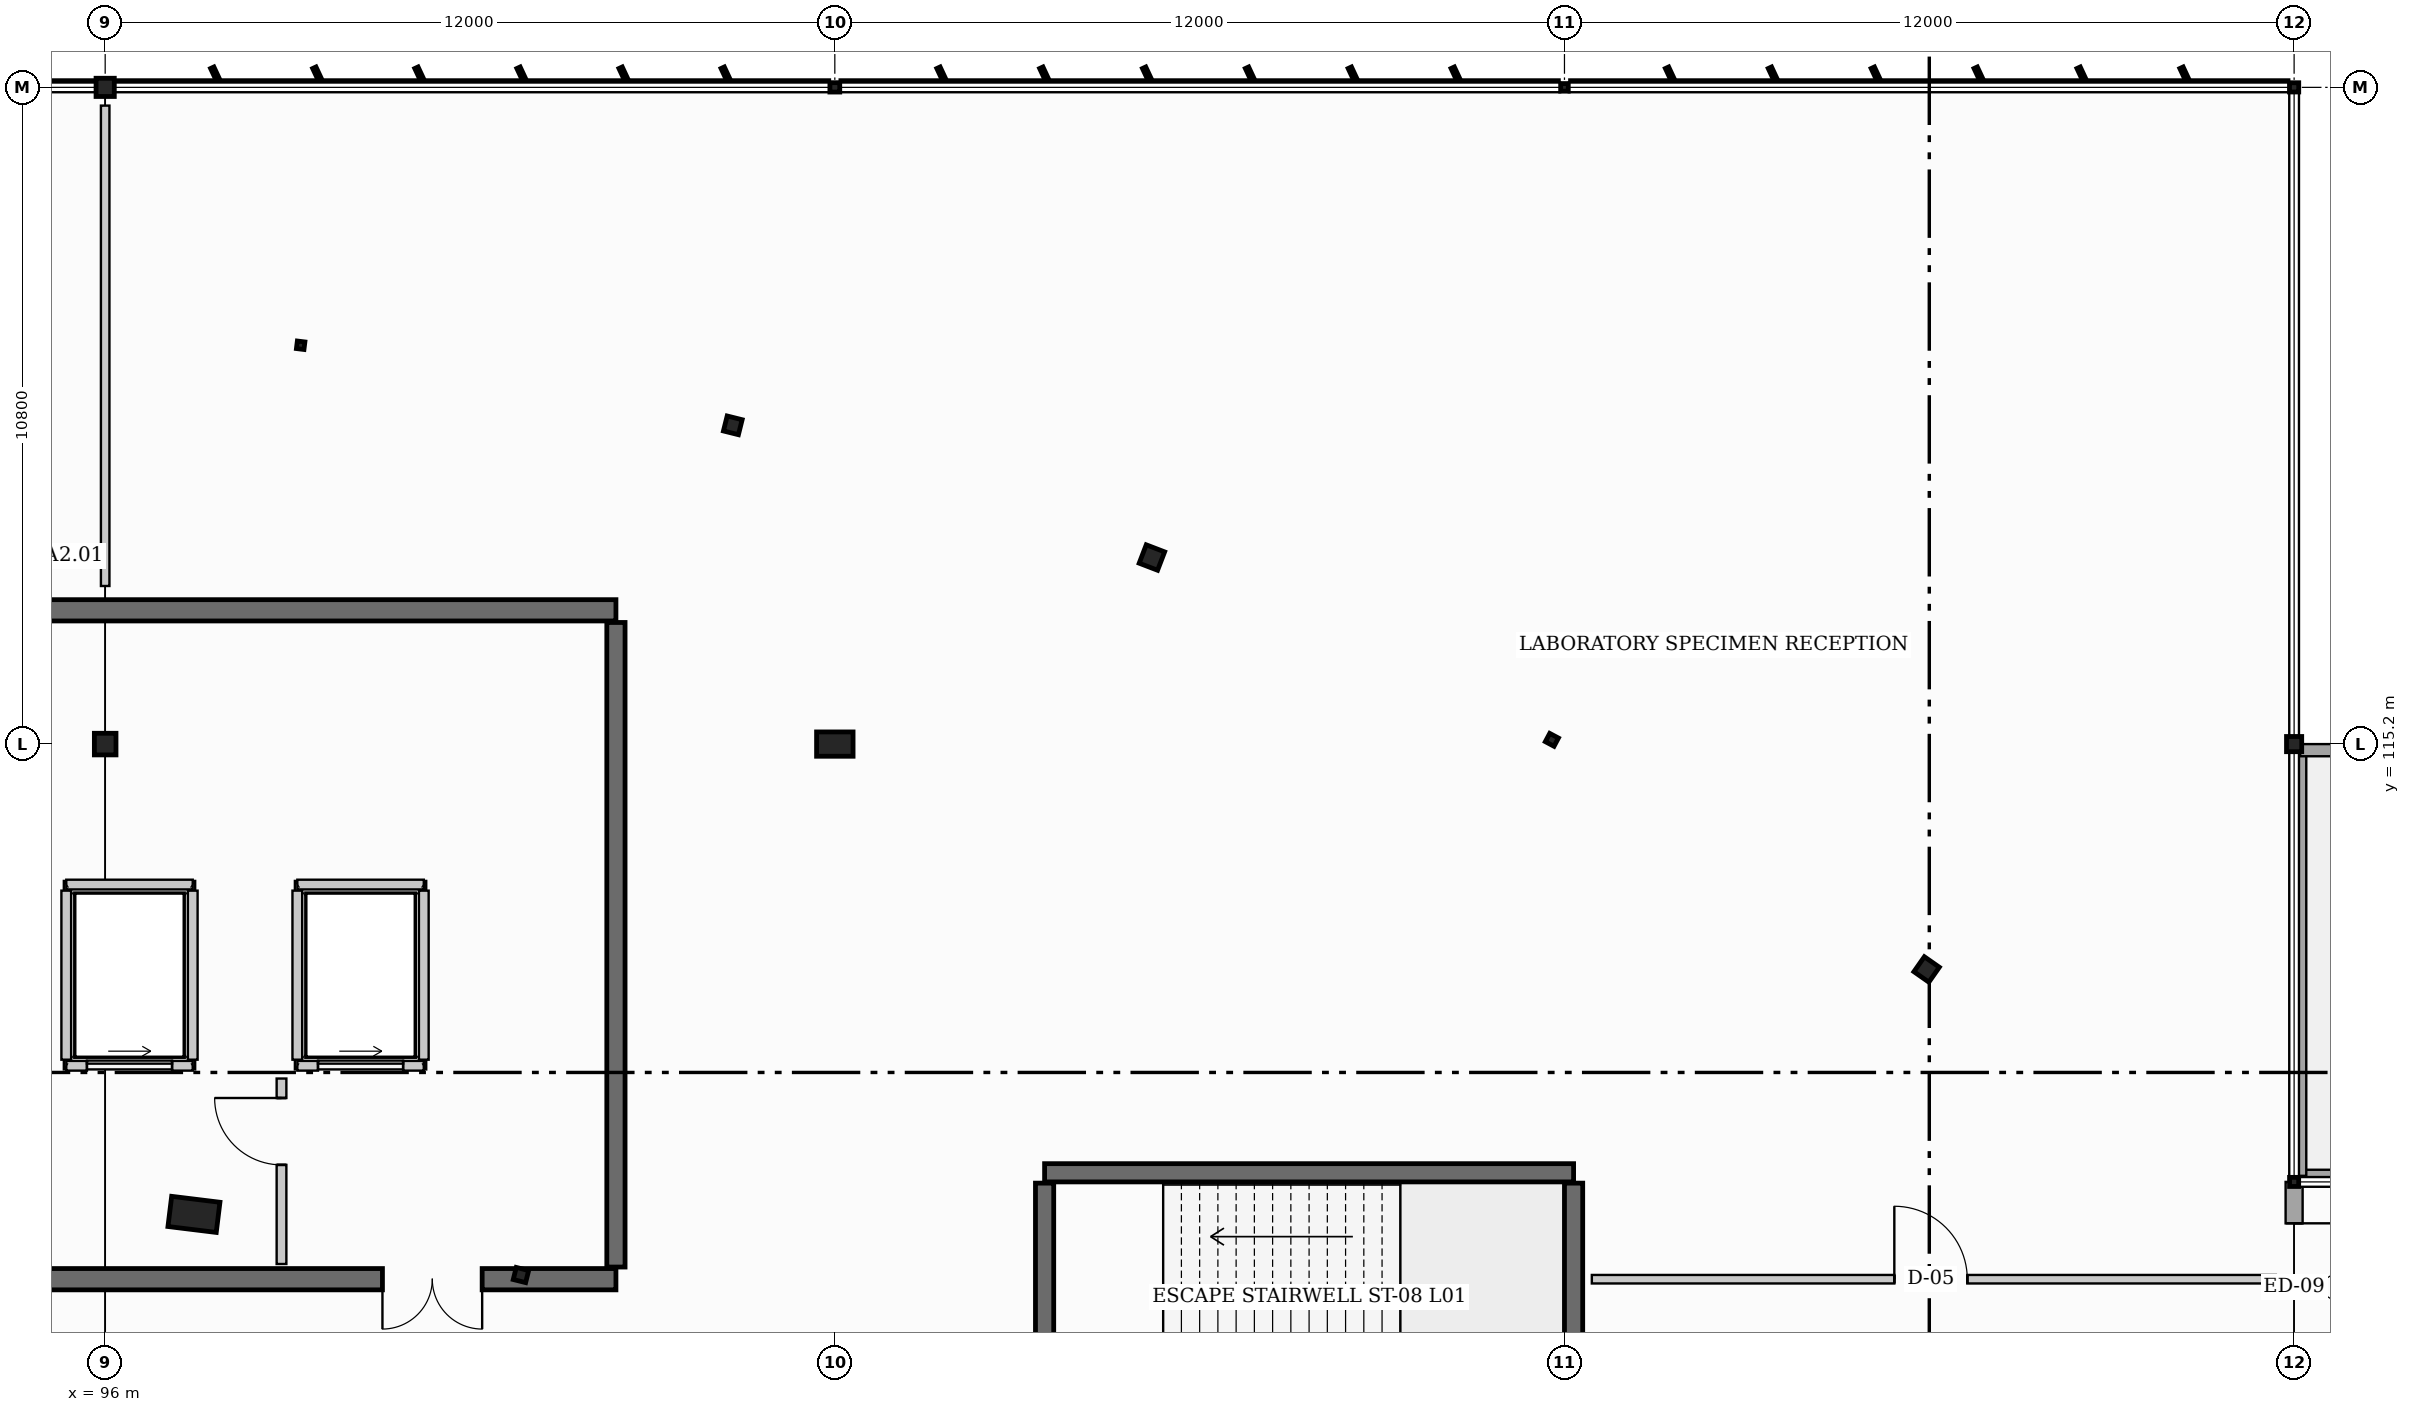
"""IFC4 building model, lengths in metres.
Left out: names, types, materials, properties, quantities, classifications, styles, units other than length and angle.
Written with IfcOpenShell. Run it as: python <this file> out.ifc"""

import sys

from ifc_helpers import new_model, si_unit, direction, frame, frame_2d, origin, origin_2d, place, context, subcontext, project, spatial, rectangle, hollow_rectangle, hollow_circle, i_section, extrude, element, fill, save


model = new_model("IFC4")
c1 = context("Model", 3, precision=1e-05, world=origin(), true_north=direction((0.0, 1.0)))
c2 = subcontext(c1, "Body", "Model", "MODEL_VIEW")
j1 = project(units=[si_unit("LENGTHUNIT", "METRE"), si_unit("PLANEANGLEUNIT", "RADIAN")], contexts=[c1])
p1 = place(None, origin())
s1 = spatial("IfcSite", under=j1, at=p1, CompositionType="ELEMENT")
p2 = place(p1, origin())
s2 = spatial("IfcBuilding", under=s1, at=p2, CompositionType="ELEMENT")
p3 = place(p2, frame((0.0, 0.0, 4.8)))
s3 = spatial("IfcBuildingStorey", under=s2, at=p3, CompositionType="ELEMENT", Elevation=4.8)
p4 = place(p3, frame((96.0, 115.2, 0.0), z_axis=(0.0, 0.0, 1.0), x_axis=(1.0, 0.0, 0.0)))
e1 = element("IfcColumn", 1, at=p4, inside=s3, PredefinedType="COLUMN", context=c2, shape_type="SweptSolid", body=[
    extrude(hollow_circle(Radius=0.178, WallThickness=0.013, at=origin_2d()), origin(), (0.0, 0.0, 1.0), 4.8),
])
p5 = place(p3, frame((96.0, 126.0, 0.0), z_axis=(0.0, 0.0, 1.0), x_axis=(1.0, 0.0, 0.0)))
e2 = element("IfcColumn", 2, at=p5, inside=s3, PredefinedType="COLUMN", context=c2, shape_type="SweptSolid", body=[
    extrude(hollow_rectangle(XDim=0.3, YDim=0.3, WallThickness=0.012, at=origin_2d()), origin(), (0.0, 0.0, 1.0), 4.8),
])
p6 = place(p3, frame((108.0, 115.2, 0.0), z_axis=(0.0, 0.0, 1.0), x_axis=(0.0, 1.0, 0.0)))
e3 = element("IfcColumn", 3, at=p6, inside=s3, PredefinedType="PILASTER", context=c2, shape_type="SweptSolid", body=[
    extrude(rectangle(XDim=0.4, YDim=0.6, at=origin_2d()), origin(), (0.0, 0.0, 1.0), 4.8),
])
p7 = place(p3, frame((108.0, 126.0, 0.0), z_axis=(0.0, 0.0, 1.0), x_axis=(0.0, 1.0, 0.0)))
e4 = element("IfcColumn", 4, at=p7, inside=s3, PredefinedType="COLUMN", context=c2, shape_type="SweptSolid", body=[
    extrude(i_section(OverallWidth=0.154, OverallDepth=0.162, WebThickness=0.008, FlangeThickness=0.011, at=origin_2d()), origin(), (0.0, 0.0, 1.0), 4.8),
])
p8 = place(p3, frame((120.0, 126.0, 0.0), z_axis=(0.0, 0.0, 1.0), x_axis=(1.0, 0.0, 0.0)))
e5 = element("IfcColumn", 5, at=p8, inside=s3, PredefinedType="COLUMN", context=c2, shape_type="SweptSolid", body=[
    extrude(hollow_rectangle(XDim=0.125, YDim=0.125, WallThickness=0.006, at=origin_2d()), origin(), (0.0, 0.0, 1.0), 4.8),
])
p9 = place(p3, frame((132.0, 115.2, 0.0), z_axis=(0.0, 0.0, 1.0), x_axis=(0.0, 1.0, 0.0)))
e6 = element("IfcColumn", 6, at=p9, inside=s3, PredefinedType="COLUMN", context=c2, shape_type="SweptSolid", body=[
    extrude(hollow_rectangle(XDim=0.25, YDim=0.25, WallThickness=0.012, at=origin_2d()), origin(), (0.0, 0.0, 1.0), 4.8),
])
p10 = place(p3, frame((132.0, 126.0, 0.0), z_axis=(0.0, 0.0, 1.0), x_axis=(0.0, 1.0, 0.0)))
e7 = element("IfcColumn", 7, at=p10, inside=s3, PredefinedType="COLUMN", context=c2, shape_type="SweptSolid", body=[
    extrude(i_section(OverallWidth=0.152, OverallDepth=0.152, WebThickness=0.006, FlangeThickness=0.007, at=origin_2d()), origin(), (0.0, 0.0, 1.0), 4.8),
])
p11 = place(p3, frame((99.215, 121.759, 0.0), z_axis=(0.0, 0.0, 1.0), x_axis=(0.121869343405, 0.992546151641, 0.0)))
e8 = element("IfcColumn", 8, at=p11, inside=s3, PredefinedType="COLUMN", context=c2, shape_type="SweptSolid", body=[
    extrude(hollow_rectangle(XDim=0.125, YDim=0.125, WallThickness=0.006, at=origin_2d()), origin(), (0.0, 0.0, 1.0), 4.8),
])
p12 = place(p3, frame((97.46, 107.466, 0.0), z_axis=(0.0, 0.0, 1.0), x_axis=(0.121869343405, 0.992546151641, 0.0)))
e9 = element("IfcColumn", 9, at=p12, inside=s3, PredefinedType="PILASTER", context=c2, shape_type="SweptSolid", body=[
    extrude(rectangle(XDim=0.5, YDim=0.8, at=origin_2d()), origin(), (0.0, 0.0, 1.0), 4.8),
])
p13 = place(p3, frame((106.322, 120.442, 0.0), z_axis=(0.0, 0.0, 1.0), x_axis=(0.2419218956, 0.970295726276, 0.0)))
e10 = element("IfcColumn", 10, at=p13, inside=s3, PredefinedType="COLUMN", context=c2, shape_type="SweptSolid", body=[
    extrude(i_section(OverallWidth=0.254, OverallDepth=0.254, WebThickness=0.009, FlangeThickness=0.014, at=origin_2d()), origin(), (0.0, 0.0, 1.0), 4.8),
])
p14 = place(p3, frame((102.838, 106.469, 0.0), z_axis=(0.0, 0.0, 1.0), x_axis=(0.2419218956, 0.970295726276, 0.0)))
e11 = element("IfcColumn", 11, at=p14, inside=s3, PredefinedType="COLUMN", context=c2, shape_type="SweptSolid", body=[
    extrude(i_section(OverallWidth=0.205, OverallDepth=0.21, WebThickness=0.009, FlangeThickness=0.014, at=origin_2d()), origin(), (0.0, 0.0, 1.0), 4.8),
])
p15 = place(p3, frame((113.215, 118.268, 0.0), z_axis=(0.0, 0.0, 1.0), x_axis=(0.358367949545, 0.933580426497, 0.0)))
e12 = element("IfcColumn", 12, at=p15, inside=s3, PredefinedType="COLUMN", context=c2, shape_type="SweptSolid", body=[
    extrude(hollow_circle(Radius=0.162, WallThickness=0.013, at=origin_2d()), origin(), (0.0, 0.0, 1.0), 4.8),
])
p16 = place(p3, frame((119.793, 115.27, 0.0), z_axis=(0.0, 0.0, 1.0), x_axis=(0.469471562786, 0.882947592859, 0.0)))
e13 = element("IfcColumn", 13, at=p16, inside=s3, PredefinedType="COLUMN", context=c2, shape_type="SweptSolid", body=[
    extrude(i_section(OverallWidth=0.154, OverallDepth=0.162, WebThickness=0.008, FlangeThickness=0.011, at=origin_2d()), origin(), (0.0, 0.0, 1.0), 4.8),
])
p17 = place(p3, frame((125.956, 111.494, 0.0), z_axis=(0.0, 0.0, 1.0), x_axis=(0.573576436351, 0.819152044289, 0.0)))
e14 = element("IfcColumn", 14, at=p17, inside=s3, PredefinedType="COLUMN", context=c2, shape_type="SweptSolid", body=[
    extrude(hollow_rectangle(XDim=0.3, YDim=0.3, WallThickness=0.012, at=origin_2d()), origin(), (0.0, 0.0, 1.0), 4.8),
])
p18 = place(p3, frame((132.0, 108.0, 0.0), z_axis=(0.0, 0.0, 1.0), x_axis=(1.0, 0.0, 0.0)))
e15 = element("IfcColumn", 15, at=p18, inside=s3, PredefinedType="COLUMN", context=c2, shape_type="SweptSolid", body=[
    extrude(hollow_rectangle(XDim=0.15, YDim=0.15, WallThickness=0.008, at=origin_2d()), origin(), (0.0, 0.0, 1.0), 4.8),
])
p19 = place(p3, frame((84.0, 117.4, 0.0), z_axis=(0.0, 0.0, 1.0), x_axis=(1.0, 0.0, 0.0)))
e16 = element("IfcWall", 16, at=p19, inside=s3, PredefinedType="SHEAR", context=c2, shape_type="SweptSolid", body=[
    extrude(rectangle(XDim=20.4, YDim=0.35, at=frame_2d((10.2, 0.0))), origin(), (0.0, 0.0, 1.0), 4.8),
])
p20 = place(p3, frame((104.4, 106.4, 0.0), z_axis=(0.0, 0.0, 1.0), x_axis=(-1.0, 0.0, 0.0)))
e17 = element("IfcWall", 17, at=p20, inside=s3, PredefinedType="SHEAR", context=c2, shape_type="SweptSolid", body=[
    extrude(rectangle(XDim=20.4, YDim=0.35, at=frame_2d((10.2, 0.0))), origin(), (0.0, 0.0, 1.0), 4.8),
])
p21 = place(p20, frame((2.2, 0.0, 0.0)))
e18 = element("IfcOpeningElement", 18, at=p21, cuts=e17, PredefinedType="OPENING", context=c2, shape_type="SweptSolid", body=[
    extrude(rectangle(XDim=1.64, YDim=2.2, at=frame_2d((0.82, 1.1))), frame((0.0, 0.185, 0.0), z_axis=(0.0, -1.0, 0.0), x_axis=(1.0, 0.0, 0.0)), (0.0, 0.0, 1.0), 0.37),
])
p22 = place(p20, frame((13.0, 0.0, 0.0)))
e19 = element("IfcOpeningElement", 19, at=p22, cuts=e17, PredefinedType="OPENING", context=c2, shape_type="SweptSolid", body=[
    extrude(rectangle(XDim=1.52, YDim=2.16, at=frame_2d((0.76, 1.08))), frame((0.0, 0.185, 0.0), z_axis=(0.0, -1.0, 0.0), x_axis=(1.0, 0.0, 0.0)), (0.0, 0.0, 1.0), 0.37),
])
p23 = place(p3, frame((104.4, 117.2, 0.0), z_axis=(0.0, 0.0, 1.0), x_axis=(0.0, -1.0, 0.0)))
e20 = element("IfcWall", 20, at=p23, inside=s3, PredefinedType="SHEAR", context=c2, shape_type="SweptSolid", body=[
    extrude(rectangle(XDim=10.6, YDim=0.3, at=frame_2d((5.3, 0.0))), origin(), (0.0, 0.0, 1.0), 4.8),
])
p24 = place(p3, frame((120.15, 108.15, 0.0), z_axis=(0.0, 0.0, 1.0), x_axis=(-1.0, 0.0, 0.0)))
e21 = element("IfcWall", 21, at=p24, inside=s3, PredefinedType="SHEAR", context=c2, shape_type="SweptSolid", body=[
    extrude(rectangle(XDim=8.7, YDim=0.3, at=frame_2d((4.35, 0.0))), origin(), (0.0, 0.0, 1.0), 4.8),
])
for number, where, z_axis, x_axis in (
    (22, (111.45, 104.22, 0.0), (0.0, 0.0, 1.0), (0.0, 1.0, 0.0)),
    (23, (120.15, 104.22, 0.0), (0.0, 0.0, 1.0), (0.0, 1.0, 0.0)),
):
    element("IfcWall", number, at=place(p3, frame(where, z_axis=z_axis, x_axis=x_axis)), inside=s3, PredefinedType="SHEAR", context=c2, shape_type="SweptSolid", body=[
        extrude(rectangle(XDim=3.76, YDim=0.3, at=frame_2d((1.88, 0.0))), origin(), (0.0, 0.0, 1.0), 4.8),
    ])
p25 = place(p3, frame((132.0, 108.0, 0.0), z_axis=(0.0, 0.0, 1.0), x_axis=(0.0, -1.0, 0.0)))
e24 = element("IfcWall", 24, at=p25, inside=s3, PredefinedType="STANDARD", context=c2, shape_type="SweptSolid", body=[
    extrude(rectangle(XDim=9.6, YDim=0.28, at=frame_2d((4.8, 0.0))), origin(), (0.0, 0.0, 1.0), 3.818),
])
p26 = place(p25, frame((0.681, 0.0, 0.0)))
e25 = element("IfcOpeningElement", 25, at=p26, cuts=e24, PredefinedType="OPENING", context=c2, shape_type="SweptSolid", body=[
    extrude(rectangle(XDim=2.1, YDim=2.25, at=frame_2d((1.05, 1.125))), frame((0.0, 0.15, 0.0), z_axis=(0.0, -1.0, 0.0), x_axis=(1.0, 0.0, 0.0)), (0.0, 0.0, 1.0), 0.3),
])
p27 = place(p3, frame((143.9, 108.1, 0.31), z_axis=(0.0, 0.0, 1.0), x_axis=(-1.0, 0.0, 0.0)))
e26 = element("IfcWall", 26, at=p27, inside=s3, PredefinedType="PARAPET", context=c2, shape_type="SweptSolid", body=[
    extrude(rectangle(XDim=11.8, YDim=0.2, at=frame_2d((5.9, 0.0))), origin(), (0.0, 0.0, 1.0), 1.12),
])
p28 = place(p3, frame((132.1, 108.1, 0.31), z_axis=(0.0, 0.0, 1.0), x_axis=(0.0, 1.0, 0.0)))
e27 = element("IfcWall", 27, at=p28, inside=s3, PredefinedType="PARAPET", context=c2, shape_type="SweptSolid", body=[
    extrude(rectangle(XDim=7.0, YDim=0.2, at=frame_2d((3.5, 0.0))), origin(), (0.0, 0.0, 1.0), 1.12),
])
p29 = place(p3, frame((132.1, 115.1, 0.31), z_axis=(0.0, 0.0, 1.0), x_axis=(1.0, 0.0, 0.0)))
e28 = element("IfcWall", 28, at=p29, inside=s3, PredefinedType="PARAPET", context=c2, shape_type="SweptSolid", body=[
    extrude(rectangle(XDim=11.8, YDim=0.2, at=frame_2d((5.9, 0.0))), origin(), (0.0, 0.0, 1.0), 1.12),
])
p30 = place(p3, frame((95.36, 109.91, 0.0), z_axis=(0.0, 0.0, 1.0), x_axis=(1.0, 0.0, 0.0)))
e29 = element("IfcWall", 29, at=p30, inside=s3, PredefinedType="PARTITIONING", context=c2, shape_type="SweptSolid", body=[
    extrude(rectangle(XDim=2.08, YDim=0.16, at=frame_2d((1.04, 0.0))), origin(), (0.0, 0.0, 1.0), 4.43),
])
p31 = place(p30, frame((0.34, 0.0, 0.0)))
e30 = element("IfcOpeningElement", 30, at=p31, cuts=e29, PredefinedType="OPENING", context=c2, shape_type="SweptSolid", body=[
    extrude(rectangle(XDim=1.4, YDim=2.2, at=frame_2d((0.7, 1.1))), frame((0.0, 0.09, 0.0), z_axis=(0.0, -1.0, 0.0), x_axis=(1.0, 0.0, 0.0)), (0.0, 0.0, 1.0), 0.18),
])
p32 = place(p3, frame((97.44, 112.89, 0.0), z_axis=(0.0, 0.0, 1.0), x_axis=(-1.0, 0.0, 0.0)))
e31 = element("IfcWall", 31, at=p32, inside=s3, PredefinedType="PARTITIONING", context=c2, shape_type="SweptSolid", body=[
    extrude(rectangle(XDim=2.08, YDim=0.16, at=frame_2d((1.04, 0.0))), origin(), (0.0, 0.0, 1.0), 4.43),
])
for number, where, z_axis, x_axis in (
    (32, (95.36, 112.79, 0.0), (0.0, 0.0, 1.0), (0.0, -1.0, 0.0)),
    (33, (97.44, 110.01, 0.0), (0.0, 0.0, 1.0), (0.0, 1.0, 0.0)),
):
    element("IfcWall", number, at=place(p3, frame(where, z_axis=z_axis, x_axis=x_axis)), inside=s3, PredefinedType="PARTITIONING", context=c2, shape_type="SweptSolid", body=[
        extrude(rectangle(XDim=2.78, YDim=0.16, at=frame_2d((1.39, 0.0))), origin(), (0.0, 0.0, 1.0), 4.43),
    ])
p33 = place(p3, frame((99.16, 109.91, 0.0), z_axis=(0.0, 0.0, 1.0), x_axis=(1.0, 0.0, 0.0)))
e34 = element("IfcWall", 34, at=p33, inside=s3, PredefinedType="PARTITIONING", context=c2, shape_type="SweptSolid", body=[
    extrude(rectangle(XDim=2.08, YDim=0.16, at=frame_2d((1.04, 0.0))), origin(), (0.0, 0.0, 1.0), 4.43),
])
p34 = place(p33, frame((0.34, 0.0, 0.0)))
e35 = element("IfcOpeningElement", 35, at=p34, cuts=e34, PredefinedType="OPENING", context=c2, shape_type="SweptSolid", body=[
    extrude(rectangle(XDim=1.4, YDim=2.2, at=frame_2d((0.7, 1.1))), frame((0.0, 0.09, 0.0), z_axis=(0.0, -1.0, 0.0), x_axis=(1.0, 0.0, 0.0)), (0.0, 0.0, 1.0), 0.18),
])
p35 = place(p3, frame((101.24, 112.89, 0.0), z_axis=(0.0, 0.0, 1.0), x_axis=(-1.0, 0.0, 0.0)))
e36 = element("IfcWall", 36, at=p35, inside=s3, PredefinedType="PARTITIONING", context=c2, shape_type="SweptSolid", body=[
    extrude(rectangle(XDim=2.08, YDim=0.16, at=frame_2d((1.04, 0.0))), origin(), (0.0, 0.0, 1.0), 4.43),
])
for number, where, z_axis, x_axis in (
    (37, (99.16, 112.79, 0.0), (0.0, 0.0, 1.0), (0.0, -1.0, 0.0)),
    (38, (101.24, 110.01, 0.0), (0.0, 0.0, 1.0), (0.0, 1.0, 0.0)),
):
    element("IfcWall", number, at=place(p3, frame(where, z_axis=z_axis, x_axis=x_axis)), inside=s3, PredefinedType="PARTITIONING", context=c2, shape_type="SweptSolid", body=[
        extrude(rectangle(XDim=2.78, YDim=0.16, at=frame_2d((1.39, 0.0))), origin(), (0.0, 0.0, 1.0), 4.43),
    ])
p36 = place(p3, frame((98.9, 106.65, 0.0), z_axis=(0.0, 0.0, 1.0), x_axis=(0.0, 1.0, 0.0)))
e39 = element("IfcWall", 39, at=p36, inside=s3, PredefinedType="PARTITIONING", context=c2, shape_type="SweptSolid", body=[
    extrude(rectangle(XDim=3.05, YDim=0.16, at=frame_2d((1.525, 0.0))), origin(), (0.0, 0.0, 1.0), 4.43),
])
p37 = place(p36, frame((1.63, 0.0, 0.0)))
e40 = element("IfcOpeningElement", 40, at=p37, cuts=e39, PredefinedType="OPENING", context=c2, shape_type="SweptSolid", body=[
    extrude(rectangle(XDim=1.1, YDim=2.15, at=frame_2d((0.55, 1.075))), frame((0.0, 0.09, 0.0), z_axis=(0.0, -1.0, 0.0), x_axis=(1.0, 0.0, 0.0)), (0.0, 0.0, 1.0), 0.18),
])
p38 = place(p3, frame((96.0, 117.8, 0.0), z_axis=(0.0, 0.0, 1.0), x_axis=(0.0, 1.0, 0.0)))
e41 = element("IfcWall", 41, at=p38, inside=s3, PredefinedType="PARTITIONING", context=c2, shape_type="SweptSolid", body=[
    extrude(rectangle(XDim=7.9, YDim=0.14, at=frame_2d((3.95, 0.0))), origin(), (0.0, 0.0, 1.0), 3.97),
])
p39 = place(p3, frame((120.45, 106.4, 0.0), z_axis=(0.0, 0.0, 1.0), x_axis=(1.0, 0.0, 0.0)))
e42 = element("IfcWall", 42, at=p39, inside=s3, PredefinedType="PARTITIONING", context=c2, shape_type="SweptSolid", body=[
    extrude(rectangle(XDim=11.25, YDim=0.14, at=frame_2d((5.625, 0.0))), origin(), (0.0, 0.0, 1.0), 3.976),
])
p40 = place(p39, frame((4.975, 0.0, 0.0)))
e43 = element("IfcOpeningElement", 43, at=p40, cuts=e42, PredefinedType="OPENING", context=c2, shape_type="SweptSolid", body=[
    extrude(rectangle(XDim=1.2, YDim=2.12, at=frame_2d((0.6, 1.06))), frame((0.0, 0.08, 0.0), z_axis=(0.0, -1.0, 0.0), x_axis=(1.0, 0.0, 0.0)), (0.0, 0.0, 1.0), 0.16),
])
p41 = place(p26, origin())
e44 = element("IfcDoor", 44, at=p41, inside=s3, OperationType="DOUBLE_DOOR_SINGLE_SWING", PredefinedType="DOOR", context=c2, shape_type="SweptSolid", body=[
    extrude(rectangle(XDim=2.1, YDim=2.25, at=frame_2d((1.05, 1.125))), frame((0.0, 0.025, 0.0), z_axis=(0.0, -1.0, 0.0), x_axis=(1.0, 0.0, 0.0)), (0.0, 0.0, 1.0), 0.05),
])
fill(e25, e44)
p42 = place(p31, origin())
e45 = element("IfcDoor", 45, at=p42, inside=s3, OperationType="SLIDING_TO_LEFT", PredefinedType="DOOR", context=c2, shape_type="SweptSolid", body=[
    extrude(rectangle(XDim=1.4, YDim=2.2, at=frame_2d((0.7, 1.1))), frame((0.0, 0.025, 0.0), z_axis=(0.0, -1.0, 0.0), x_axis=(1.0, 0.0, 0.0)), (0.0, 0.0, 1.0), 0.05),
])
fill(e30, e45)
p43 = place(p34, origin())
e46 = element("IfcDoor", 46, at=p43, inside=s3, OperationType="SLIDING_TO_LEFT", PredefinedType="DOOR", context=c2, shape_type="SweptSolid", body=[
    extrude(rectangle(XDim=1.4, YDim=2.2, at=frame_2d((0.7, 1.1))), frame((0.0, 0.025, 0.0), z_axis=(0.0, -1.0, 0.0), x_axis=(1.0, 0.0, 0.0)), (0.0, 0.0, 1.0), 0.05),
])
fill(e35, e46)
p44 = place(p21, origin())
e47 = element("IfcDoor", 47, at=p44, inside=s3, OperationType="DOUBLE_DOOR_SINGLE_SWING", PredefinedType="DOOR", context=c2, shape_type="SweptSolid", body=[
    extrude(rectangle(XDim=1.64, YDim=2.2, at=frame_2d((0.82, 1.1))), frame((0.0, 0.025, 0.0), z_axis=(0.0, -1.0, 0.0), x_axis=(1.0, 0.0, 0.0)), (0.0, 0.0, 1.0), 0.05),
])
fill(e18, e47)
p45 = place(p37, origin())
e48 = element("IfcDoor", 48, at=p45, inside=s3, OperationType="SINGLE_SWING_RIGHT", PredefinedType="DOOR", context=c2, shape_type="SweptSolid", body=[
    extrude(rectangle(XDim=1.1, YDim=2.15, at=frame_2d((0.55, 1.075))), frame((0.0, 0.025, 0.0), z_axis=(0.0, -1.0, 0.0), x_axis=(1.0, 0.0, 0.0)), (0.0, 0.0, 1.0), 0.05),
])
fill(e40, e48)
p46 = place(p40, origin())
e49 = element("IfcDoor", 49, at=p46, inside=s3, OperationType="SINGLE_SWING_LEFT", PredefinedType="DOOR", context=c2, shape_type="SweptSolid", body=[
    extrude(rectangle(XDim=1.2, YDim=2.12, at=frame_2d((0.6, 1.06))), frame((0.0, 0.025, 0.0), z_axis=(0.0, -1.0, 0.0), x_axis=(1.0, 0.0, 0.0)), (0.0, 0.0, 1.0), 0.05),
])
fill(e43, e49)
save(model, sys.argv[1])
